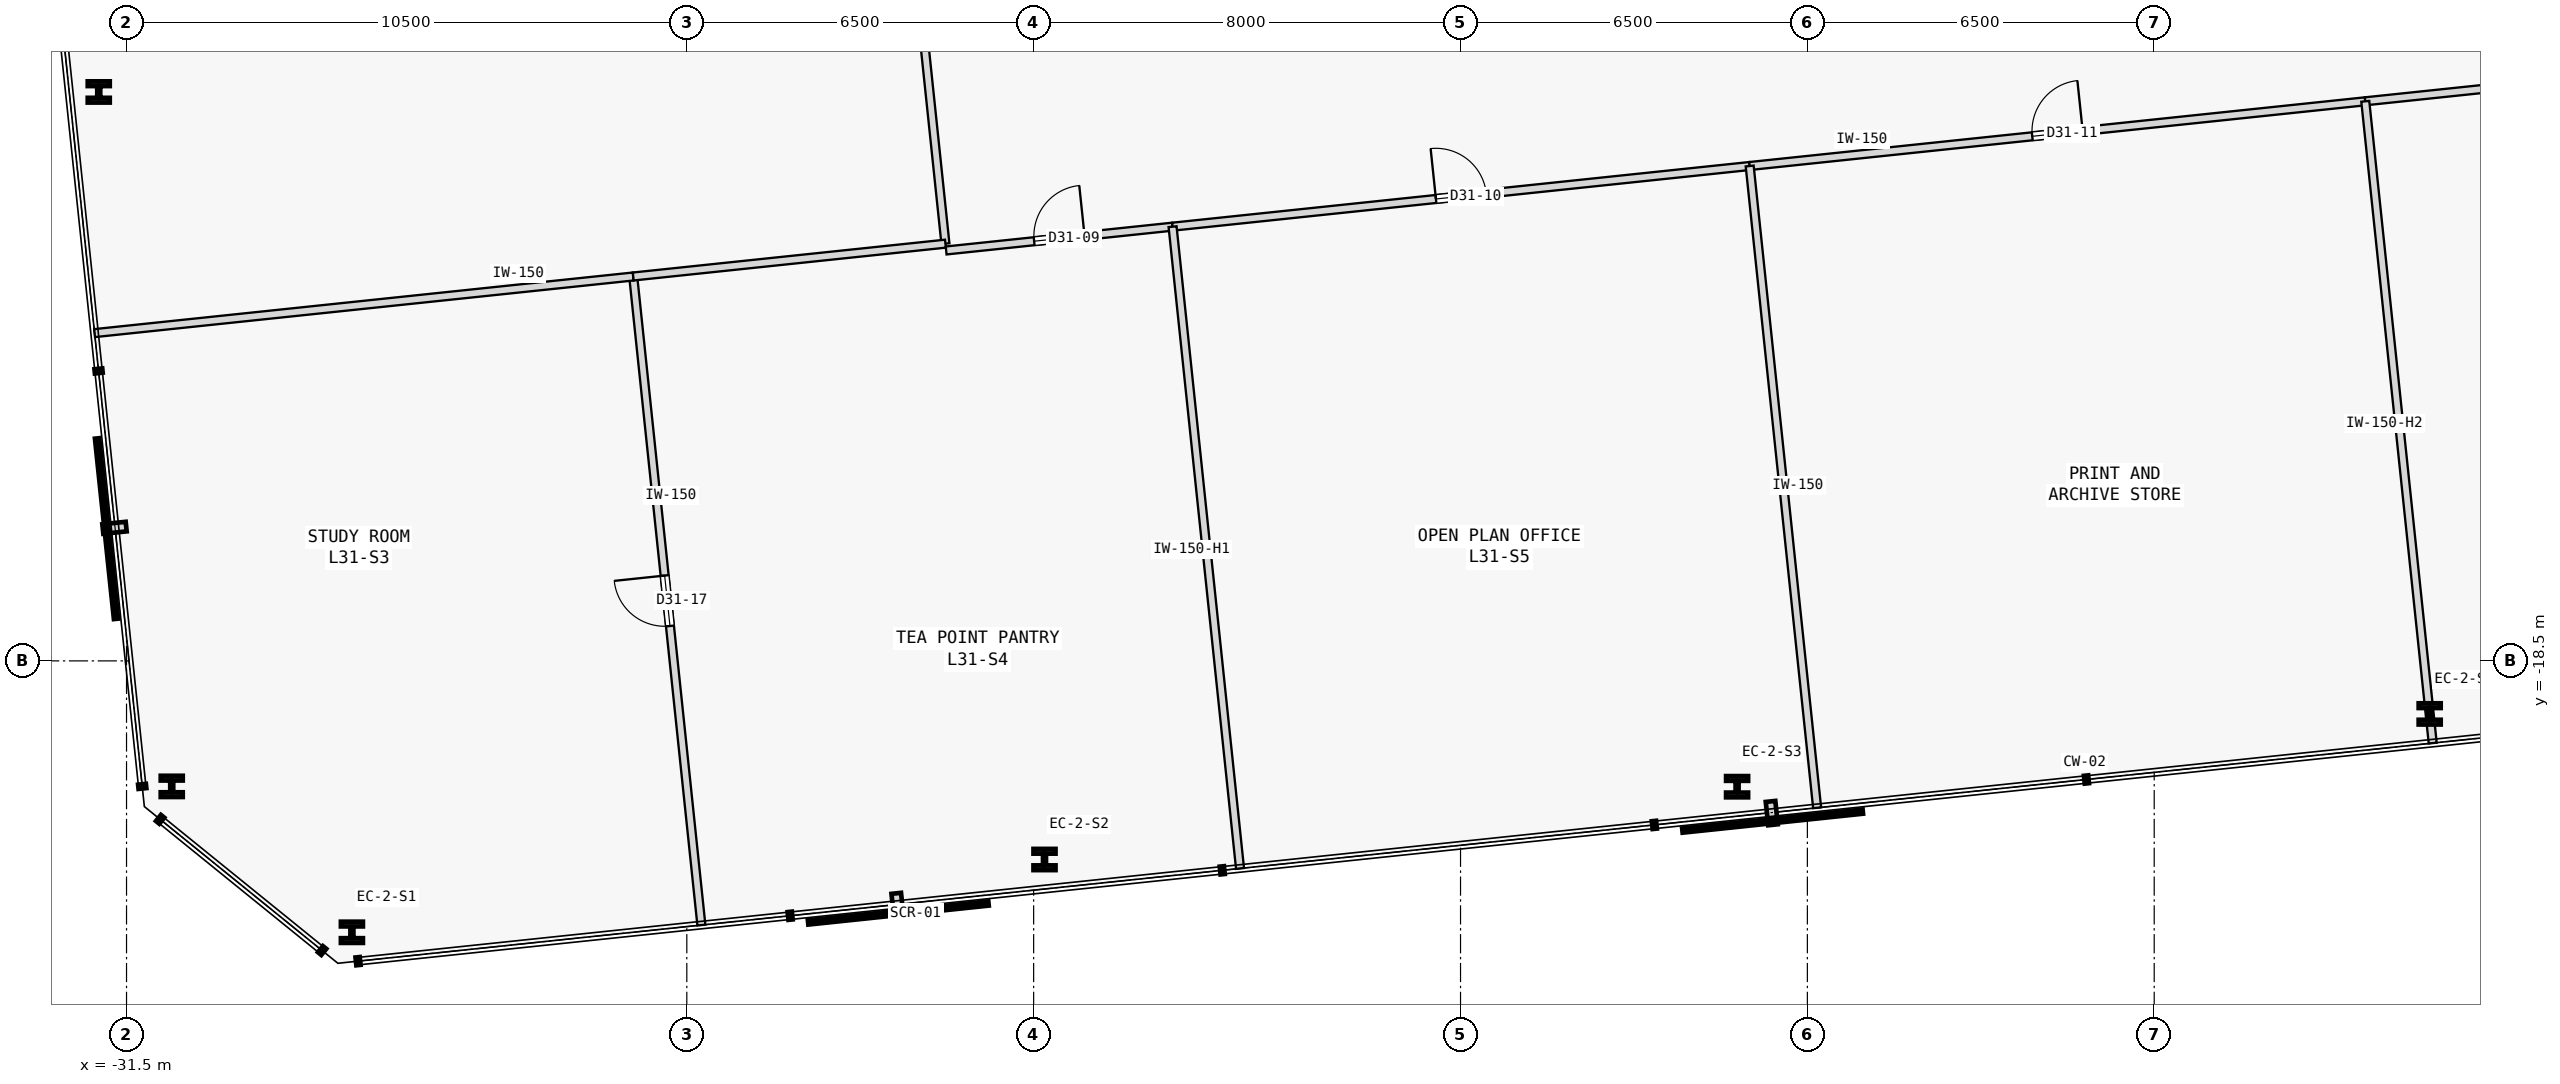
"""IFC4 building model, lengths in metres.
Left out: names, types, materials, properties, quantities, classifications, styles, units other than length and angle.
Written with IfcOpenShell. Run it as: python <this file> out.ifc"""

import sys

from ifc_helpers import new_model, si_unit, direction, frame, frame_2d, origin, origin_2d, place, context, subcontext, project, spatial, rectangle, i_section, extrude, element, fill, save


model = new_model("IFC4")
c1 = context("Model", 3, precision=1e-05, world=origin(), true_north=direction((0.0, 1.0)))
c2 = subcontext(c1, "Body", "Model", "MODEL_VIEW")
j1 = project(units=[si_unit("LENGTHUNIT", "METRE"), si_unit("PLANEANGLEUNIT", "RADIAN")], contexts=[c1])
p1 = place(None, origin())
s1 = spatial("IfcSite", under=j1, at=p1, CompositionType="ELEMENT")
p2 = place(p1, origin())
s2 = spatial("IfcBuilding", under=s1, at=p2, CompositionType="ELEMENT")
p3 = place(p2, frame((0.0, 0.0, 124.4)))
s3 = spatial("IfcBuildingStorey", under=s2, at=p3, CompositionType="ELEMENT", Elevation=124.4)
for number, where, z_axis, x_axis in (
    (1, (-27.276, -23.586, 0.0), (0.0, 0.0, 1.0), (1.0, 0.0, 0.0)),
    (2, (-14.297, -22.222, 0.0), (0.0, 0.0, 1.0), (1.0, 0.0, 0.0)),
    (3, (-1.317, -20.858, 0.0), (0.0, 0.0, 1.0), (1.0, 0.0, 0.0)),
    (4, (11.663, -19.494, 0.0), (0.0, 0.0, 1.0), (1.0, 0.0, 0.0)),
    (5, (-32.021, -7.838, 0.0), (0.0, 0.0, 1.0), (1.0, 0.0, 0.0)),
    (6, (-30.653, -20.852, 0.0), (0.0, 0.0, 1.0), (1.0, 0.0, 0.0)),
):
    element("IfcColumn", number, at=place(p3, frame(where, z_axis=z_axis, x_axis=x_axis)), inside=s3, PredefinedType="COLUMN", context=c2, shape_type="SweptSolid", body=[
        extrude(i_section(OverallWidth=0.413, OverallDepth=0.398, WebThickness=0.056, FlangeThickness=0.089, FilletRadius=0.015, at=origin_2d()), origin(), (0.0, 0.0, 1.0), 3.7),
    ])
p4 = place(p3, frame((-16.14, -10.809, 0.0), z_axis=(0.0, 0.0, 1.0), x_axis=(0.994520805081, 0.104538836136, 0.0)))
e7 = element("IfcWall", 7, at=p4, inside=s3, PredefinedType="PARTITIONING", context=c2, shape_type="SweptSolid", body=[
    extrude(rectangle(XDim=4.267, YDim=0.15, at=frame_2d((2.133, 0.0))), origin(), (0.0, 0.0, 1.0), 3.475),
])
p5 = place(p4, frame((1.658, 0.0, 0.0)))
e8 = element("IfcOpeningElement", 8, at=p5, cuts=e7, PredefinedType="OPENING", context=c2, shape_type="SweptSolid", body=[
    extrude(rectangle(XDim=0.95, YDim=2.15, at=frame_2d((0.475, 1.075))), frame((0.0, 0.085, 0.0), z_axis=(0.0, -1.0, 0.0), x_axis=(1.0, 0.0, 0.0)), (0.0, 0.0, 1.0), 0.17),
])
p6 = place(p3, frame((-11.896, -10.363, 0.0), z_axis=(0.0, 0.0, 1.0), x_axis=(0.994522169869, 0.104525851533, 0.0)))
e9 = element("IfcWall", 9, at=p6, inside=s3, PredefinedType="PARTITIONING", context=c2, shape_type="SweptSolid", body=[
    extrude(rectangle(XDim=10.875, YDim=0.15, at=frame_2d((5.438, 0.0))), origin(), (0.0, 0.0, 1.0), 3.475),
])
p7 = place(p6, frame((4.962, 0.0, 0.0)))
e10 = element("IfcOpeningElement", 10, at=p7, cuts=e9, PredefinedType="OPENING", context=c2, shape_type="SweptSolid", body=[
    extrude(rectangle(XDim=0.95, YDim=2.15, at=frame_2d((0.475, 1.075))), frame((0.0, 0.085, 0.0), z_axis=(0.0, -1.0, 0.0), x_axis=(1.0, 0.0, 0.0)), (0.0, 0.0, 1.0), 0.17),
])
p8 = place(p3, frame((-1.081, -9.226, 0.0), z_axis=(0.0, 0.0, 1.0), x_axis=(0.994523198252, 0.104516066418, 0.0)))
e11 = element("IfcWall", 11, at=p8, inside=s3, PredefinedType="PARTITIONING", context=c2, shape_type="SweptSolid", body=[
    extrude(rectangle(XDim=11.6, YDim=0.15, at=frame_2d((5.8, 0.0))), origin(), (0.0, 0.0, 1.0), 3.475),
])
p9 = place(p8, frame((5.325, 0.0, 0.0)))
e12 = element("IfcOpeningElement", 12, at=p9, cuts=e11, PredefinedType="OPENING", context=c2, shape_type="SweptSolid", body=[
    extrude(rectangle(XDim=0.95, YDim=2.15, at=frame_2d((0.475, 1.075))), frame((0.0, 0.085, 0.0), z_axis=(0.0, -1.0, 0.0), x_axis=(1.0, 0.0, 0.0)), (0.0, 0.0, 1.0), 0.17),
])
p10 = place(p3, frame((10.456, -8.014, 0.0), z_axis=(0.0, 0.0, 1.0), x_axis=(0.994522690965, 0.104520893393, 0.0)))
e13 = element("IfcWall", 13, at=p10, inside=s3, PredefinedType="PARTITIONING", context=c2, shape_type="SweptSolid", body=[
    extrude(rectangle(XDim=7.832, YDim=0.15, at=frame_2d((3.916, 0.0))), origin(), (0.0, 0.0, 1.0), 3.475),
])
p11 = place(p10, frame((3.441, 0.0, 0.0)))
e14 = element("IfcOpeningElement", 14, at=p11, cuts=e13, PredefinedType="OPENING", context=c2, shape_type="SweptSolid", body=[
    extrude(rectangle(XDim=0.95, YDim=2.15, at=frame_2d((0.475, 1.075))), frame((0.0, 0.085, 0.0), z_axis=(0.0, -1.0, 0.0), x_axis=(1.0, 0.0, 0.0)), (0.0, 0.0, 1.0), 0.17),
])
p12 = place(p3, frame((-16.153, -10.682, 0.0), z_axis=(0.0, 0.0, 1.0), x_axis=(-0.104527614588, 0.994521984568, 0.0)))
e15 = element("IfcWall", 15, at=p12, inside=s3, PredefinedType="PARTITIONING", context=c2, shape_type="SweptSolid", body=[
    extrude(rectangle(XDim=17.87, YDim=0.15, at=frame_2d((8.935, 0.0))), origin(), (0.0, 0.0, 1.0), 3.475),
])
p13 = place(p12, frame((8.46, 0.0, 0.0)))
e16 = element("IfcOpeningElement", 16, at=p13, cuts=e15, PredefinedType="OPENING", context=c2, shape_type="SweptSolid", body=[
    extrude(rectangle(XDim=0.95, YDim=2.15, at=frame_2d((0.475, 1.075))), frame((0.0, 0.085, 0.0), z_axis=(0.0, -1.0, 0.0), x_axis=(1.0, 0.0, 0.0)), (0.0, 0.0, 1.0), 0.17),
])
p14 = place(p3, frame((-20.727, -23.451, 0.0), z_axis=(0.0, 0.0, 1.0), x_axis=(-0.104522554453, 0.994522516392, 0.0)))
e17 = element("IfcWall", 17, at=p14, inside=s3, PredefinedType="PARTITIONING", context=c2, shape_type="SweptSolid", body=[
    extrude(rectangle(XDim=12.221, YDim=0.15, at=frame_2d((6.11, 0.0))), origin(), (0.0, 0.0, 1.0), 3.475),
])
p15 = place(p14, frame((5.635, 0.0, 0.0)))
e18 = element("IfcOpeningElement", 18, at=p15, cuts=e17, PredefinedType="OPENING", context=c2, shape_type="SweptSolid", body=[
    extrude(rectangle(XDim=0.95, YDim=2.15, at=frame_2d((0.475, 1.075))), frame((0.0, 0.085, 0.0), z_axis=(0.0, -1.0, 0.0), x_axis=(1.0, 0.0, 0.0)), (0.0, 0.0, 1.0), 0.17),
])
p16 = place(p3, frame((-32.099, -12.358, 0.0), z_axis=(0.0, 0.0, 1.0), x_axis=(0.994523757593, 0.104510743869, 0.0)))
e19 = element("IfcWall", 19, at=p16, inside=s3, PredefinedType="PARTITIONING", context=c2, shape_type="SweptSolid", body=[
    extrude(rectangle(XDim=10.15, YDim=0.15, at=frame_2d((5.075, 0.0))), origin(), (0.0, 0.0, 1.0), 3.475),
])
p17 = place(p3, frame((-10.632, -22.39, 0.0), z_axis=(0.0, 0.0, 1.0), x_axis=(-0.104535555083, 0.994521149963, 0.0)))
e20 = element("IfcWall", 20, at=p17, inside=s3, PredefinedType="PARTITIONING", context=c2, shape_type="SweptSolid", body=[
    extrude(rectangle(XDim=12.093, YDim=0.15, at=frame_2d((6.046, 0.0))), origin(), (0.0, 0.0, 1.0), 3.025),
])
p18 = place(p3, frame((-22.004, -11.297, 0.0), z_axis=(0.0, 0.0, 1.0), x_axis=(0.994521131746, 0.10453572839, 0.0)))
e21 = element("IfcWall", 21, at=p18, inside=s3, PredefinedType="PARTITIONING", context=c2, shape_type="SweptSolid", body=[
    extrude(rectangle(XDim=5.883, YDim=0.15, at=frame_2d((2.941, 0.0))), origin(), (0.0, 0.0, 1.0), 3.475),
])
p19 = place(p3, frame((0.183, -21.253, 0.0), z_axis=(0.0, 0.0, 1.0), x_axis=(-0.104535555083, 0.994521149963, 0.0)))
e22 = element("IfcWall", 22, at=p19, inside=s3, PredefinedType="PARTITIONING", context=c2, shape_type="SweptSolid", body=[
    extrude(rectangle(XDim=12.093, YDim=0.15, at=frame_2d((6.046, 0.0))), origin(), (0.0, 0.0, 1.0), 3.475),
])
p20 = place(p3, frame((11.719, -20.041, 0.0), z_axis=(0.0, 0.0, 1.0), x_axis=(-0.104517685722, 0.994523028075, 0.0)))
e23 = element("IfcWall", 23, at=p20, inside=s3, PredefinedType="PARTITIONING", context=c2, shape_type="SweptSolid", body=[
    extrude(rectangle(XDim=12.093, YDim=0.15, at=frame_2d((6.046, 0.0))), origin(), (0.0, 0.0, 1.0), 2.875),
])
p21 = place(p5, origin())
e24 = element("IfcDoor", 24, at=p21, inside=s3, OperationType="SINGLE_SWING_RIGHT", PredefinedType="DOOR", context=c2, shape_type="SweptSolid", body=[
    extrude(rectangle(XDim=0.95, YDim=2.15, at=frame_2d((0.475, 1.075))), frame((0.0, 0.025, 0.0), z_axis=(0.0, -1.0, 0.0), x_axis=(1.0, 0.0, 0.0)), (0.0, 0.0, 1.0), 0.05),
])
fill(e8, e24)
p22 = place(p7, origin())
e25 = element("IfcDoor", 25, at=p22, inside=s3, OperationType="SINGLE_SWING_LEFT", PredefinedType="DOOR", context=c2, shape_type="SweptSolid", body=[
    extrude(rectangle(XDim=0.95, YDim=2.15, at=frame_2d((0.475, 1.075))), frame((0.0, 0.025, 0.0), z_axis=(0.0, -1.0, 0.0), x_axis=(1.0, 0.0, 0.0)), (0.0, 0.0, 1.0), 0.05),
])
fill(e10, e25)
p23 = place(p9, origin())
e26 = element("IfcDoor", 26, at=p23, inside=s3, OperationType="SINGLE_SWING_RIGHT", PredefinedType="DOOR", context=c2, shape_type="SweptSolid", body=[
    extrude(rectangle(XDim=0.95, YDim=2.15, at=frame_2d((0.475, 1.075))), frame((0.0, 0.025, 0.0), z_axis=(0.0, -1.0, 0.0), x_axis=(1.0, 0.0, 0.0)), (0.0, 0.0, 1.0), 0.05),
])
fill(e12, e26)
p24 = place(p15, origin())
e27 = element("IfcDoor", 27, at=p24, inside=s3, OperationType="SINGLE_SWING_RIGHT", PredefinedType="DOOR", context=c2, shape_type="SweptSolid", body=[
    extrude(rectangle(XDim=0.95, YDim=2.15, at=frame_2d((0.475, 1.075))), frame((0.0, 0.025, 0.0), z_axis=(0.0, -1.0, 0.0), x_axis=(1.0, 0.0, 0.0)), (0.0, 0.0, 1.0), 0.05),
])
fill(e18, e27)
save(model, sys.argv[1])
